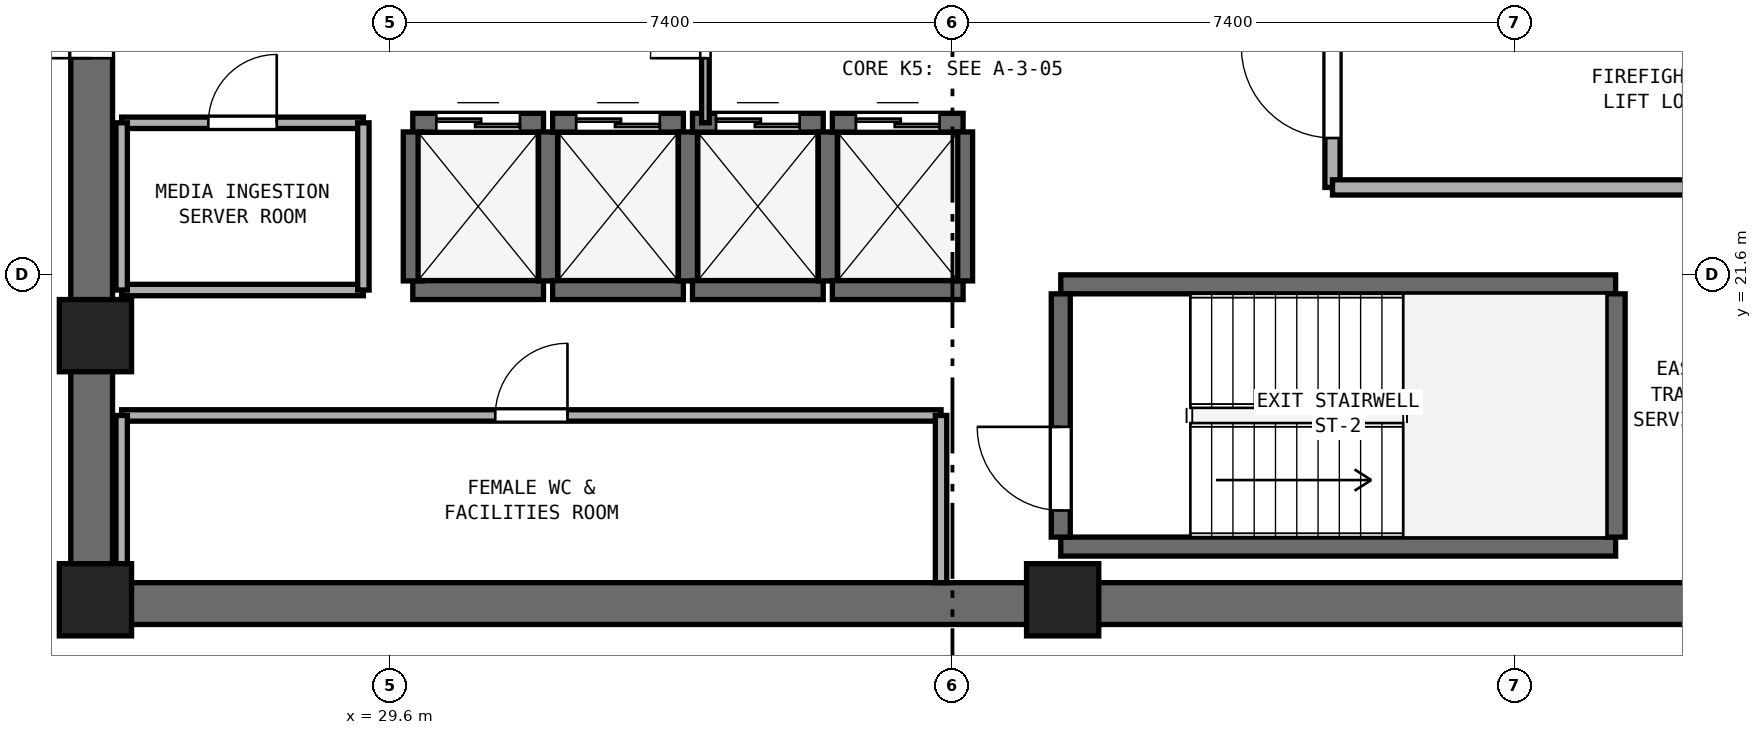
"""IFC4 building model, lengths in metres.
Left out: names, types, materials, properties, quantities, classifications, styles, units other than length and angle.
Written with IfcOpenShell. Run it as: python <this file> out.ifc"""

import sys

from ifc_helpers import new_model, si_unit, direction, frame, frame_2d, origin, origin_2d, place, context, subcontext, project, spatial, rectangle, extrude, element, fill, save


model = new_model("IFC4")
c1 = context("Model", 3, precision=1e-05, world=origin(), true_north=direction((0.0, 1.0)))
c2 = subcontext(c1, "Body", "Model", "MODEL_VIEW")
j1 = project(units=[si_unit("LENGTHUNIT", "METRE"), si_unit("PLANEANGLEUNIT", "RADIAN")], contexts=[c1])
p1 = place(None, origin())
s1 = spatial("IfcSite", under=j1, at=p1, CompositionType="ELEMENT")
p2 = place(p1, origin())
s2 = spatial("IfcBuilding", under=s1, at=p2, CompositionType="ELEMENT")
p3 = place(p2, frame((0.0, 0.0, 128.8)))
s3 = spatial("IfcBuildingStorey", under=s2, at=p3, CompositionType="ELEMENT", Elevation=128.8)
p4 = place(p3, frame((25.4, 17.275, 0.0), z_axis=(0.0, 0.0, 1.0), x_axis=(1.0, 0.0, 0.0)))
e1 = element("IfcWall", 1, at=p4, inside=s3, PredefinedType="SHEAR", context=c2, shape_type="SweptSolid", body=[
    extrude(rectangle(XDim=23.2, YDim=0.55, at=frame_2d((11.6, 0.0))), origin(), (0.0, 0.0, 1.0), 3.54),
])
p5 = place(p3, frame((25.675, 17.55, 0.0), z_axis=(0.0, 0.0, 1.0), x_axis=(0.0, 1.0, 0.0)))
e2 = element("IfcWall", 2, at=p5, inside=s3, PredefinedType="SHEAR", context=c2, shape_type="SweptSolid", body=[
    extrude(rectangle(XDim=15.3, YDim=0.55, at=frame_2d((7.65, 0.0))), origin(), (0.0, 0.0, 1.0), 3.54),
])
p6 = place(p5, frame((6.9, 0.0, 0.0)))
e3 = element("IfcOpeningElement", 3, at=p6, cuts=e2, PredefinedType="OPENING", context=c2, shape_type="SweptSolid", body=[
    extrude(rectangle(XDim=1.5, YDim=2.15, at=frame_2d((0.75, 1.075))), frame((0.0, 0.285, 0.0), z_axis=(0.0, -1.0, 0.0), x_axis=(1.0, 0.0, 0.0)), (0.0, 0.0, 1.0), 0.57),
])
for number, where, z_axis, x_axis in (
    (4, (25.725, 17.325, 0.0), (0.0, 0.0, 1.0), (1.0, 0.0, 0.0)),
    (5, (38.45, 17.325, 0.0), (0.0, 0.0, 1.0), (1.0, 0.0, 0.0)),
    (6, (25.725, 20.8, 0.0), (0.0, 0.0, 1.0), (1.0, 0.0, 0.0)),
):
    element("IfcColumn", number, at=place(p3, frame(where, z_axis=z_axis, x_axis=x_axis)), inside=s3, PredefinedType="PILASTER", context=c2, shape_type="SweptSolid", body=[
        extrude(rectangle(XDim=0.95, YDim=0.95, at=origin_2d()), origin(), (0.0, 0.0, 1.0), 3.8),
    ])
for number, where, z_axis, x_axis in (
    (7, (38.425, 18.025, 0.0), (0.0, 0.0, 1.0), (1.0, 0.0, 0.0)),
    (8, (38.425, 21.475, 0.0), (0.0, 0.0, 1.0), (1.0, 0.0, 0.0)),
):
    element("IfcWall", number, at=place(p3, frame(where, z_axis=z_axis, x_axis=x_axis)), inside=s3, PredefinedType="SHEAR", context=c2, shape_type="SweptSolid", body=[
        extrude(rectangle(XDim=7.3, YDim=0.25, at=frame_2d((3.65, 0.0))), origin(), (0.0, 0.0, 1.0), 3.54),
    ])
p7 = place(p3, frame((38.425, 18.15, 0.0), z_axis=(0.0, 0.0, 1.0), x_axis=(0.0, 1.0, 0.0)))
e9 = element("IfcWall", 9, at=p7, inside=s3, PredefinedType="SHEAR", context=c2, shape_type="SweptSolid", body=[
    extrude(rectangle(XDim=3.2, YDim=0.25, at=frame_2d((1.6, 0.0))), origin(), (0.0, 0.0, 1.0), 3.54),
])
p8 = place(p7, frame((0.35, 0.0, 0.0)))
e10 = element("IfcOpeningElement", 10, at=p8, cuts=e9, PredefinedType="OPENING", context=c2, shape_type="SweptSolid", body=[
    extrude(rectangle(XDim=1.1, YDim=2.15, at=frame_2d((0.55, 1.075))), frame((0.0, 0.135, 0.0), z_axis=(0.0, -1.0, 0.0), x_axis=(1.0, 0.0, 0.0)), (0.0, 0.0, 1.0), 0.27),
])
p9 = place(p3, frame((45.725, 18.15, 0.0), z_axis=(0.0, 0.0, 1.0), x_axis=(0.0, 1.0, 0.0)))
e11 = element("IfcWall", 11, at=p9, inside=s3, PredefinedType="SHEAR", context=c2, shape_type="SweptSolid", body=[
    extrude(rectangle(XDim=3.2, YDim=0.25, at=frame_2d((1.6, 0.0))), origin(), (0.0, 0.0, 1.0), 3.54),
])
p10 = place(p3, frame((29.9, 21.4, 0.0), z_axis=(0.0, 0.0, 1.0), x_axis=(1.0, 0.0, 0.0)))
e12 = element("IfcWall", 12, at=p10, inside=s3, PredefinedType="SHEAR", context=c2, shape_type="SweptSolid", body=[
    extrude(rectangle(XDim=1.72, YDim=0.25, at=frame_2d((0.86, 0.0))), origin(), (0.0, 0.0, 1.0), 3.54),
])
p11 = place(p3, frame((29.9, 23.6, 0.0), z_axis=(0.0, 0.0, 1.0), x_axis=(1.0, 0.0, 0.0)))
e13 = element("IfcWall", 13, at=p11, inside=s3, PredefinedType="SHEAR", context=c2, shape_type="SweptSolid", body=[
    extrude(rectangle(XDim=1.72, YDim=0.25, at=frame_2d((0.86, 0.0))), origin(), (0.0, 0.0, 1.0), 3.54),
])
p12 = place(p11, frame((0.31, 0.0, 0.0)))
e14 = element("IfcOpeningElement", 14, at=p12, cuts=e13, PredefinedType="OPENING", context=c2, shape_type="SweptSolid", body=[
    extrude(rectangle(XDim=1.1, YDim=2.15, at=frame_2d((0.55, 1.075))), frame((0.0, 0.135, 0.0), z_axis=(0.0, -1.0, 0.0), x_axis=(1.0, 0.0, 0.0)), (0.0, 0.0, 1.0), 0.27),
])
for number, where, z_axis, x_axis in (
    (15, (29.9, 21.52, 0.0), (0.0, 0.0, 1.0), (0.0, 1.0, 0.0)),
    (16, (31.68, 21.52, 0.0), (0.0, 0.0, 1.0), (0.0, 1.0, 0.0)),
):
    element("IfcWall", number, at=place(p3, frame(where, z_axis=z_axis, x_axis=x_axis)), inside=s3, PredefinedType="SHEAR", context=c2, shape_type="SweptSolid", body=[
        extrude(rectangle(XDim=1.96, YDim=0.25, at=frame_2d((0.98, 0.0))), origin(), (0.0, 0.0, 1.0), 3.54),
    ])
p13 = place(p3, frame((31.74, 21.4, 0.0), z_axis=(0.0, 0.0, 1.0), x_axis=(1.0, 0.0, 0.0)))
e17 = element("IfcWall", 17, at=p13, inside=s3, PredefinedType="SHEAR", context=c2, shape_type="SweptSolid", body=[
    extrude(rectangle(XDim=1.72, YDim=0.25, at=frame_2d((0.86, 0.0))), origin(), (0.0, 0.0, 1.0), 3.54),
])
p14 = place(p3, frame((31.74, 23.6, 0.0), z_axis=(0.0, 0.0, 1.0), x_axis=(1.0, 0.0, 0.0)))
e18 = element("IfcWall", 18, at=p14, inside=s3, PredefinedType="SHEAR", context=c2, shape_type="SweptSolid", body=[
    extrude(rectangle(XDim=1.72, YDim=0.25, at=frame_2d((0.86, 0.0))), origin(), (0.0, 0.0, 1.0), 3.54),
])
p15 = place(p14, frame((0.31, 0.0, 0.0)))
e19 = element("IfcOpeningElement", 19, at=p15, cuts=e18, PredefinedType="OPENING", context=c2, shape_type="SweptSolid", body=[
    extrude(rectangle(XDim=1.1, YDim=2.15, at=frame_2d((0.55, 1.075))), frame((0.0, 0.135, 0.0), z_axis=(0.0, -1.0, 0.0), x_axis=(1.0, 0.0, 0.0)), (0.0, 0.0, 1.0), 0.27),
])
p16 = place(p3, frame((33.52, 21.52, 0.0), z_axis=(0.0, 0.0, 1.0), x_axis=(0.0, 1.0, 0.0)))
e20 = element("IfcWall", 20, at=p16, inside=s3, PredefinedType="SHEAR", context=c2, shape_type="SweptSolid", body=[
    extrude(rectangle(XDim=1.96, YDim=0.25, at=frame_2d((0.98, 0.0))), origin(), (0.0, 0.0, 1.0), 3.54),
])
p17 = place(p3, frame((33.58, 21.4, 0.0), z_axis=(0.0, 0.0, 1.0), x_axis=(1.0, 0.0, 0.0)))
e21 = element("IfcWall", 21, at=p17, inside=s3, PredefinedType="SHEAR", context=c2, shape_type="SweptSolid", body=[
    extrude(rectangle(XDim=1.72, YDim=0.25, at=frame_2d((0.86, 0.0))), origin(), (0.0, 0.0, 1.0), 3.54),
])
p18 = place(p3, frame((33.58, 23.6, 0.0), z_axis=(0.0, 0.0, 1.0), x_axis=(1.0, 0.0, 0.0)))
e22 = element("IfcWall", 22, at=p18, inside=s3, PredefinedType="SHEAR", context=c2, shape_type="SweptSolid", body=[
    extrude(rectangle(XDim=1.72, YDim=0.25, at=frame_2d((0.86, 0.0))), origin(), (0.0, 0.0, 1.0), 3.54),
])
p19 = place(p18, frame((0.31, 0.0, 0.0)))
e23 = element("IfcOpeningElement", 23, at=p19, cuts=e22, PredefinedType="OPENING", context=c2, shape_type="SweptSolid", body=[
    extrude(rectangle(XDim=1.1, YDim=2.15, at=frame_2d((0.55, 1.075))), frame((0.0, 0.135, 0.0), z_axis=(0.0, -1.0, 0.0), x_axis=(1.0, 0.0, 0.0)), (0.0, 0.0, 1.0), 0.27),
])
p20 = place(p3, frame((35.36, 21.52, 0.0), z_axis=(0.0, 0.0, 1.0), x_axis=(0.0, 1.0, 0.0)))
e24 = element("IfcWall", 24, at=p20, inside=s3, PredefinedType="SHEAR", context=c2, shape_type="SweptSolid", body=[
    extrude(rectangle(XDim=1.96, YDim=0.25, at=frame_2d((0.98, 0.0))), origin(), (0.0, 0.0, 1.0), 3.54),
])
p21 = place(p3, frame((35.42, 21.4, 0.0), z_axis=(0.0, 0.0, 1.0), x_axis=(1.0, 0.0, 0.0)))
e25 = element("IfcWall", 25, at=p21, inside=s3, PredefinedType="SHEAR", context=c2, shape_type="SweptSolid", body=[
    extrude(rectangle(XDim=1.72, YDim=0.25, at=frame_2d((0.86, 0.0))), origin(), (0.0, 0.0, 1.0), 3.54),
])
p22 = place(p3, frame((35.42, 23.6, 0.0), z_axis=(0.0, 0.0, 1.0), x_axis=(1.0, 0.0, 0.0)))
e26 = element("IfcWall", 26, at=p22, inside=s3, PredefinedType="SHEAR", context=c2, shape_type="SweptSolid", body=[
    extrude(rectangle(XDim=1.72, YDim=0.25, at=frame_2d((0.86, 0.0))), origin(), (0.0, 0.0, 1.0), 3.54),
])
p23 = place(p22, frame((0.31, 0.0, 0.0)))
e27 = element("IfcOpeningElement", 27, at=p23, cuts=e26, PredefinedType="OPENING", context=c2, shape_type="SweptSolid", body=[
    extrude(rectangle(XDim=1.1, YDim=2.15, at=frame_2d((0.55, 1.075))), frame((0.0, 0.135, 0.0), z_axis=(0.0, -1.0, 0.0), x_axis=(1.0, 0.0, 0.0)), (0.0, 0.0, 1.0), 0.27),
])
p24 = place(p3, frame((37.14, 21.52, 0.0), z_axis=(0.0, 0.0, 1.0), x_axis=(0.0, 1.0, 0.0)))
e28 = element("IfcWall", 28, at=p24, inside=s3, PredefinedType="SHEAR", context=c2, shape_type="SweptSolid", body=[
    extrude(rectangle(XDim=1.96, YDim=0.25, at=frame_2d((0.98, 0.0))), origin(), (0.0, 0.0, 1.0), 3.54),
])
p25 = place(p3, frame((42.0, 22.75, 0.0), z_axis=(0.0, 0.0, 1.0), x_axis=(0.0, 1.0, 0.0)))
e29 = element("IfcWall", 29, at=p25, inside=s3, PredefinedType="SOLIDWALL", context=c2, shape_type="SweptSolid", body=[
    extrude(rectangle(XDim=6.05, YDim=0.2, at=frame_2d((3.025, 0.0))), origin(), (0.0, 0.0, 1.0), 3.54),
])
p26 = place(p25, frame((0.65, 0.0, 0.0)))
e30 = element("IfcOpeningElement", 30, at=p26, cuts=e29, PredefinedType="OPENING", context=c2, shape_type="SweptSolid", body=[
    extrude(rectangle(XDim=1.2, YDim=2.15, at=frame_2d((0.6, 1.075))), frame((0.0, 0.11, 0.0), z_axis=(0.0, -1.0, 0.0), x_axis=(1.0, 0.0, 0.0)), (0.0, 0.0, 1.0), 0.22),
])
p27 = place(p3, frame((42.0, 22.75, 0.0), z_axis=(0.0, 0.0, 1.0), x_axis=(1.0, 0.0, 0.0)))
e31 = element("IfcWall", 31, at=p27, inside=s3, PredefinedType="SOLIDWALL", context=c2, shape_type="SweptSolid", body=[
    extrude(rectangle(XDim=6.05, YDim=0.2, at=frame_2d((3.025, 0.0))), origin(), (0.0, 0.0, 1.0), 3.54),
])
p28 = place(p3, frame((26.07, 19.75, 0.0), z_axis=(0.0, 0.0, 1.0), x_axis=(1.0, 0.0, 0.0)))
e32 = element("IfcWall", 32, at=p28, inside=s3, PredefinedType="PARTITIONING", context=c2, shape_type="SweptSolid", body=[
    extrude(rectangle(XDim=10.78, YDim=0.15, at=frame_2d((5.39, 0.0))), origin(), (0.0, 0.0, 1.0), 3.54),
])
p29 = place(p28, frame((4.915, 0.0, 0.0)))
e33 = element("IfcOpeningElement", 33, at=p29, cuts=e32, PredefinedType="OPENING", context=c2, shape_type="SweptSolid", body=[
    extrude(rectangle(XDim=0.95, YDim=2.1, at=frame_2d((0.475, 1.05))), frame((0.0, 0.085, 0.0), z_axis=(0.0, -1.0, 0.0), x_axis=(1.0, 0.0, 0.0)), (0.0, 0.0, 1.0), 0.17),
])
p30 = place(p3, frame((26.07, 17.55, 0.0), z_axis=(0.0, 0.0, 1.0), x_axis=(0.0, 1.0, 0.0)))
e34 = element("IfcWall", 34, at=p30, inside=s3, PredefinedType="PARTITIONING", context=c2, shape_type="SweptSolid", body=[
    extrude(rectangle(XDim=2.2, YDim=0.15, at=frame_2d((1.1, 0.0))), origin(), (0.0, 0.0, 1.0), 2.64),
])
p31 = place(p3, frame((36.85, 17.55, 0.0), z_axis=(0.0, 0.0, 1.0), x_axis=(0.0, 1.0, 0.0)))
e35 = element("IfcWall", 35, at=p31, inside=s3, PredefinedType="PARTITIONING", context=c2, shape_type="SweptSolid", body=[
    extrude(rectangle(XDim=2.2, YDim=0.15, at=frame_2d((1.1, 0.0))), origin(), (0.0, 0.0, 1.0), 3.54),
])
p32 = place(p3, frame((26.07, 21.4, 0.0), z_axis=(0.0, 0.0, 1.0), x_axis=(1.0, 0.0, 0.0)))
e36 = element("IfcWall", 36, at=p32, inside=s3, PredefinedType="PARTITIONING", context=c2, shape_type="SweptSolid", body=[
    extrude(rectangle(XDim=3.18, YDim=0.15, at=frame_2d((1.59, 0.0))), origin(), (0.0, 0.0, 1.0), 3.54),
])
p33 = place(p3, frame((26.07, 23.6, 0.0), z_axis=(0.0, 0.0, 1.0), x_axis=(1.0, 0.0, 0.0)))
e37 = element("IfcWall", 37, at=p33, inside=s3, PredefinedType="PARTITIONING", context=c2, shape_type="SweptSolid", body=[
    extrude(rectangle(XDim=3.18, YDim=0.15, at=frame_2d((1.59, 0.0))), origin(), (0.0, 0.0, 1.0), 3.54),
])
p34 = place(p33, frame((1.14, 0.0, 0.0)))
e38 = element("IfcOpeningElement", 38, at=p34, cuts=e37, PredefinedType="OPENING", context=c2, shape_type="SweptSolid", body=[
    extrude(rectangle(XDim=0.9, YDim=2.1, at=frame_2d((0.45, 1.05))), frame((0.0, 0.085, 0.0), z_axis=(0.0, -1.0, 0.0), x_axis=(1.0, 0.0, 0.0)), (0.0, 0.0, 1.0), 0.17),
])
p35 = place(p3, frame((26.07, 21.4, 0.0), z_axis=(0.0, 0.0, 1.0), x_axis=(0.0, 1.0, 0.0)))
e39 = element("IfcWall", 39, at=p35, inside=s3, PredefinedType="PARTITIONING", context=c2, shape_type="SweptSolid", body=[
    extrude(rectangle(XDim=2.2, YDim=0.15, at=frame_2d((1.1, 0.0))), origin(), (0.0, 0.0, 1.0), 2.64),
])
p36 = place(p3, frame((29.25, 21.4, 0.0), z_axis=(0.0, 0.0, 1.0), x_axis=(0.0, 1.0, 0.0)))
e40 = element("IfcWall", 40, at=p36, inside=s3, PredefinedType="PARTITIONING", context=c2, shape_type="SweptSolid", body=[
    extrude(rectangle(XDim=2.2, YDim=0.15, at=frame_2d((1.1, 0.0))), origin(), (0.0, 0.0, 1.0), 3.54),
])
p37 = place(p3, frame((33.75, 23.6, 0.0), z_axis=(0.0, 0.0, 1.0), x_axis=(0.0, 1.0, 0.0)))
e41 = element("IfcWall", 41, at=p37, inside=s3, PredefinedType="PARTITIONING", context=c2, shape_type="SweptSolid", body=[
    extrude(rectangle(XDim=3.2, YDim=0.1, at=frame_2d((1.6, 0.0))), origin(), (0.0, 0.0, 1.0), 3.54),
])
p38 = place(p37, frame((0.85, 0.0, 0.0)))
e42 = element("IfcOpeningElement", 42, at=p38, cuts=e41, PredefinedType="OPENING", context=c2, shape_type="SweptSolid", body=[
    extrude(rectangle(XDim=1.45, YDim=2.12, at=frame_2d((0.725, 1.06))), frame((0.0, 0.06, 0.0), z_axis=(0.0, -1.0, 0.0), x_axis=(1.0, 0.0, 0.0)), (0.0, 0.0, 1.0), 0.12),
])
p39 = place(p8, origin())
e43 = element("IfcDoor", 43, at=p39, inside=s3, OperationType="SINGLE_SWING_RIGHT", PredefinedType="DOOR", context=c2, shape_type="SweptSolid", body=[
    extrude(rectangle(XDim=1.1, YDim=2.15, at=frame_2d((0.55, 1.075))), frame((0.0, 0.025, 0.0), z_axis=(0.0, -1.0, 0.0), x_axis=(1.0, 0.0, 0.0)), (0.0, 0.0, 1.0), 0.05),
])
fill(e10, e43)
p40 = place(p12, origin())
e44 = element("IfcDoor", 44, at=p40, inside=s3, OperationType="DOUBLE_DOOR_SLIDING", PredefinedType="DOOR", context=c2, shape_type="SweptSolid", body=[
    extrude(rectangle(XDim=1.1, YDim=2.15, at=frame_2d((0.55, 1.075))), frame((0.0, 0.025, 0.0), z_axis=(0.0, -1.0, 0.0), x_axis=(1.0, 0.0, 0.0)), (0.0, 0.0, 1.0), 0.05),
])
fill(e14, e44)
p41 = place(p15, origin())
e45 = element("IfcDoor", 45, at=p41, inside=s3, OperationType="DOUBLE_DOOR_SLIDING", PredefinedType="DOOR", context=c2, shape_type="SweptSolid", body=[
    extrude(rectangle(XDim=1.1, YDim=2.15, at=frame_2d((0.55, 1.075))), frame((0.0, 0.025, 0.0), z_axis=(0.0, -1.0, 0.0), x_axis=(1.0, 0.0, 0.0)), (0.0, 0.0, 1.0), 0.05),
])
fill(e19, e45)
p42 = place(p19, origin())
e46 = element("IfcDoor", 46, at=p42, inside=s3, OperationType="DOUBLE_DOOR_SLIDING", PredefinedType="DOOR", context=c2, shape_type="SweptSolid", body=[
    extrude(rectangle(XDim=1.1, YDim=2.15, at=frame_2d((0.55, 1.075))), frame((0.0, 0.025, 0.0), z_axis=(0.0, -1.0, 0.0), x_axis=(1.0, 0.0, 0.0)), (0.0, 0.0, 1.0), 0.05),
])
fill(e23, e46)
p43 = place(p23, origin())
e47 = element("IfcDoor", 47, at=p43, inside=s3, OperationType="DOUBLE_DOOR_SLIDING", PredefinedType="DOOR", context=c2, shape_type="SweptSolid", body=[
    extrude(rectangle(XDim=1.1, YDim=2.15, at=frame_2d((0.55, 1.075))), frame((0.0, 0.025, 0.0), z_axis=(0.0, -1.0, 0.0), x_axis=(1.0, 0.0, 0.0)), (0.0, 0.0, 1.0), 0.05),
])
fill(e27, e47)
p44 = place(p26, origin())
e48 = element("IfcDoor", 48, at=p44, inside=s3, OperationType="SINGLE_SWING_RIGHT", PredefinedType="DOOR", context=c2, shape_type="SweptSolid", body=[
    extrude(rectangle(XDim=1.2, YDim=2.15, at=frame_2d((0.6, 1.075))), frame((0.0, 0.025, 0.0), z_axis=(0.0, -1.0, 0.0), x_axis=(1.0, 0.0, 0.0)), (0.0, 0.0, 1.0), 0.05),
])
fill(e30, e48)
p45 = place(p6, origin())
e49 = element("IfcDoor", 49, at=p45, inside=s3, OperationType="DOUBLE_DOOR_SINGLE_SWING", PredefinedType="DOOR", context=c2, shape_type="SweptSolid", body=[
    extrude(rectangle(XDim=1.5, YDim=2.15, at=frame_2d((0.75, 1.075))), frame((0.0, 0.025, 0.0), z_axis=(0.0, -1.0, 0.0), x_axis=(1.0, 0.0, 0.0)), (0.0, 0.0, 1.0), 0.05),
])
fill(e3, e49)
p46 = place(p29, origin())
e50 = element("IfcDoor", 50, at=p46, inside=s3, OperationType="SINGLE_SWING_RIGHT", PredefinedType="DOOR", context=c2, shape_type="SweptSolid", body=[
    extrude(rectangle(XDim=0.95, YDim=2.1, at=frame_2d((0.475, 1.05))), frame((0.0, 0.025, 0.0), z_axis=(0.0, -1.0, 0.0), x_axis=(1.0, 0.0, 0.0)), (0.0, 0.0, 1.0), 0.05),
])
fill(e33, e50)
p47 = place(p34, origin())
e51 = element("IfcDoor", 51, at=p47, inside=s3, OperationType="SINGLE_SWING_RIGHT", PredefinedType="DOOR", context=c2, shape_type="SweptSolid", body=[
    extrude(rectangle(XDim=0.9, YDim=2.1, at=frame_2d((0.45, 1.05))), frame((0.0, 0.025, 0.0), z_axis=(0.0, -1.0, 0.0), x_axis=(1.0, 0.0, 0.0)), (0.0, 0.0, 1.0), 0.05),
])
fill(e38, e51)
p48 = place(p38, origin())
e52 = element("IfcDoor", 52, at=p48, inside=s3, OperationType="DOUBLE_DOOR_SINGLE_SWING", PredefinedType="DOOR", context=c2, shape_type="SweptSolid", body=[
    extrude(rectangle(XDim=1.45, YDim=2.12, at=frame_2d((0.725, 1.06))), frame((0.0, 0.025, 0.0), z_axis=(0.0, -1.0, 0.0), x_axis=(1.0, 0.0, 0.0)), (0.0, 0.0, 1.0), 0.05),
])
fill(e42, e52)
save(model, sys.argv[1])
